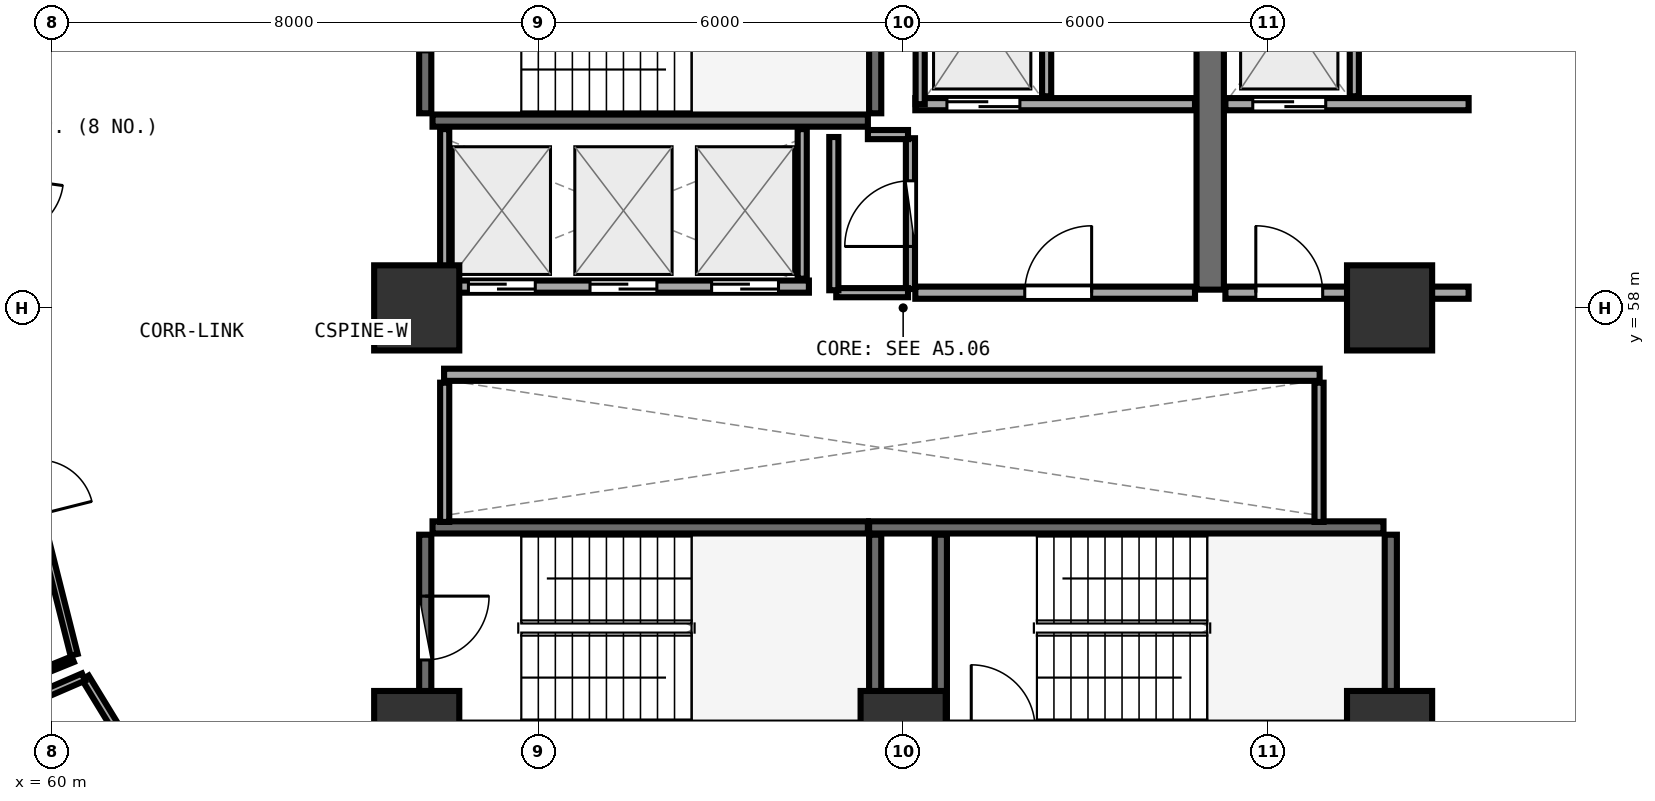
"""IFC4 building model, lengths in metres.
Left out: names, types, materials, properties, quantities, classifications, styles, units other than length and angle.
Written with IfcOpenShell. Run it as: python <this file> out.ifc"""

import sys

from ifc_helpers import new_model, si_unit, direction, frame, frame_2d, origin, origin_2d, place, context, subcontext, project, spatial, rectangle, extrude, element, fill, save


model = new_model("IFC4")
c1 = context("Model", 3, precision=1e-05, world=origin(), true_north=direction((0.0, 1.0)))
c2 = subcontext(c1, "Body", "Model", "MODEL_VIEW")
j1 = project(units=[si_unit("LENGTHUNIT", "METRE"), si_unit("PLANEANGLEUNIT", "RADIAN")], contexts=[c1])
p1 = place(None, origin())
s1 = spatial("IfcSite", under=j1, at=p1, CompositionType="ELEMENT")
p2 = place(p1, origin())
s2 = spatial("IfcBuilding", under=s1, at=p2, CompositionType="ELEMENT")
p3 = place(p2, frame((0.0, 0.0, 30.0)))
s3 = spatial("IfcBuildingStorey", under=s2, at=p3, CompositionType="ELEMENT", Elevation=30.0)
for number, where, z_axis, x_axis in (
    (1, (66.0, 51.0, 0.0), (0.0, 0.0, 1.0), (1.0, 0.0, 0.0)),
    (2, (74.0, 51.0, 0.0), (0.0, 0.0, 1.0), (1.0, 0.0, 0.0)),
    (3, (82.0, 51.0, 0.0), (0.0, 0.0, 1.0), (1.0, 0.0, 0.0)),
    (4, (82.0, 58.0, 0.0), (0.0, 0.0, 1.0), (1.0, 0.0, 0.0)),
    (5, (66.0, 58.0, 0.0), (0.0, 0.0, 1.0), (1.0, 0.0, 0.0)),
):
    element("IfcColumn", number, at=place(p3, frame(where, z_axis=z_axis, x_axis=x_axis)), inside=s3, PredefinedType="PILASTER", context=c2, shape_type="SweptSolid", body=[
        extrude(rectangle(XDim=1.4, YDim=1.4, at=origin_2d()), origin(), (0.0, 0.0, 1.0), 3.75),
    ])
p4 = place(p3, frame((66.26, 61.08, 0.0), z_axis=(0.0, 0.0, 1.0), x_axis=(1.0, 0.0, 0.0)))
e6 = element("IfcWall", 6, at=p4, inside=s3, PredefinedType="SHEAR", context=c2, shape_type="SweptSolid", body=[
    extrude(rectangle(XDim=7.16, YDim=0.2, at=frame_2d((3.58, 0.0))), origin(), (0.0, 0.0, 1.0), 3.49),
])
p5 = place(p3, frame((73.54, 61.2, 0.0), z_axis=(0.0, 0.0, 1.0), x_axis=(0.0, 1.0, 0.0)))
e7 = element("IfcWall", 7, at=p5, inside=s3, PredefinedType="SHEAR", context=c2, shape_type="SweptSolid", body=[
    extrude(rectangle(XDim=3.07, YDim=0.2, at=frame_2d((1.535, 0.0))), origin(), (0.0, 0.0, 1.0), 3.49),
])
p6 = place(p3, frame((66.14, 64.27, 0.0), z_axis=(0.0, 0.0, 1.0), x_axis=(0.0, -1.0, 0.0)))
e8 = element("IfcWall", 8, at=p6, inside=s3, PredefinedType="SHEAR", context=c2, shape_type="SweptSolid", body=[
    extrude(rectangle(XDim=3.07, YDim=0.2, at=frame_2d((1.535, 0.0))), origin(), (0.0, 0.0, 1.0), 3.49),
])
p7 = place(p6, frame((1.01, 0.0, 0.0)))
e9 = element("IfcOpeningElement", 9, at=p7, cuts=e8, PredefinedType="OPENING", context=c2, shape_type="SweptSolid", body=[
    extrude(rectangle(XDim=1.05, YDim=2.1, at=frame_2d((0.525, 1.05))), frame((0.0, 0.11, 0.0), z_axis=(0.0, -1.0, 0.0), x_axis=(1.0, 0.0, 0.0)), (0.0, 0.0, 1.0), 0.22),
])
p8 = place(p3, frame((82.02, 51.2, 0.0), z_axis=(0.0, 0.0, 1.0), x_axis=(0.0, 1.0, 0.0)))
e10 = element("IfcWall", 10, at=p8, inside=s3, PredefinedType="SHEAR", context=c2, shape_type="SweptSolid", body=[
    extrude(rectangle(XDim=3.07, YDim=0.2, at=frame_2d((1.535, 0.0))), origin(), (0.0, 0.0, 1.0), 3.49),
])
p9 = place(p3, frame((81.9, 54.39, 0.0), z_axis=(0.0, 0.0, 1.0), x_axis=(-1.0, 0.0, 0.0)))
e11 = element("IfcWall", 11, at=p9, inside=s3, PredefinedType="SHEAR", context=c2, shape_type="SweptSolid", body=[
    extrude(rectangle(XDim=8.46, YDim=0.2, at=frame_2d((4.23, 0.0))), origin(), (0.0, 0.0, 1.0), 3.49),
])
for number, where, z_axis, x_axis in (
    (12, (74.62, 54.27, 0.0), (0.0, 0.0, 1.0), (0.0, -1.0, 0.0)),
    (13, (73.54, 51.2, 0.0), (0.0, 0.0, 1.0), (0.0, 1.0, 0.0)),
):
    element("IfcWall", number, at=place(p3, frame(where, z_axis=z_axis, x_axis=x_axis)), inside=s3, PredefinedType="SHEAR", context=c2, shape_type="SweptSolid", body=[
        extrude(rectangle(XDim=3.07, YDim=0.2, at=frame_2d((1.535, 0.0))), origin(), (0.0, 0.0, 1.0), 3.49),
    ])
p10 = place(p3, frame((73.42, 54.39, 0.0), z_axis=(0.0, 0.0, 1.0), x_axis=(-1.0, 0.0, 0.0)))
e14 = element("IfcWall", 14, at=p10, inside=s3, PredefinedType="SHEAR", context=c2, shape_type="SweptSolid", body=[
    extrude(rectangle(XDim=7.16, YDim=0.2, at=frame_2d((3.58, 0.0))), origin(), (0.0, 0.0, 1.0), 3.49),
])
p11 = place(p3, frame((66.14, 54.27, 0.0), z_axis=(0.0, 0.0, 1.0), x_axis=(0.0, -1.0, 0.0)))
e15 = element("IfcWall", 15, at=p11, inside=s3, PredefinedType="SHEAR", context=c2, shape_type="SweptSolid", body=[
    extrude(rectangle(XDim=3.07, YDim=0.2, at=frame_2d((1.535, 0.0))), origin(), (0.0, 0.0, 1.0), 3.49),
])
p12 = place(p11, frame((1.01, 0.0, 0.0)))
e16 = element("IfcOpeningElement", 16, at=p12, cuts=e15, PredefinedType="OPENING", context=c2, shape_type="SweptSolid", body=[
    extrude(rectangle(XDim=1.05, YDim=2.1, at=frame_2d((0.525, 1.05))), frame((0.0, 0.11, 0.0), z_axis=(0.0, -1.0, 0.0), x_axis=(1.0, 0.0, 0.0)), (0.0, 0.0, 1.0), 0.22),
])
p13 = place(p3, frame((79.05, 58.3, 0.0), z_axis=(0.0, 0.0, 1.0), x_axis=(0.0, 1.0, 0.0)))
e17 = element("IfcWall", 17, at=p13, inside=s3, PredefinedType="SHEAR", context=c2, shape_type="SweptSolid", body=[
    extrude(rectangle(XDim=6.3, YDim=0.45, at=frame_2d((3.15, 0.0))), origin(), (0.0, 0.0, 1.0), 3.49),
])
p14 = place(p3, frame((74.2, 61.35, 0.0), z_axis=(0.0, 0.0, 1.0), x_axis=(1.0, 0.0, 0.0)))
e18 = element("IfcWall", 18, at=p14, inside=s3, PredefinedType="SOLIDWALL", context=c2, shape_type="SweptSolid", body=[
    extrude(rectangle(XDim=4.6, YDim=0.2, at=frame_2d((2.3, 0.0))), origin(), (0.0, 0.0, 1.0), 3.48),
])
p15 = place(p14, frame((0.52, 0.0, 0.0)))
e19 = element("IfcOpeningElement", 19, at=p15, cuts=e18, PredefinedType="OPENING", context=c2, shape_type="SweptSolid", body=[
    extrude(rectangle(XDim=1.2, YDim=2.15, at=frame_2d((0.6, 1.075))), frame((0.0, 0.11, 0.0), z_axis=(0.0, -1.0, 0.0), x_axis=(1.0, 0.0, 0.0)), (0.0, 0.0, 1.0), 0.22),
])
p16 = place(p3, frame((74.28, 61.35, 0.0), z_axis=(0.0, 0.0, 1.0), x_axis=(0.0, 1.0, 0.0)))
e20 = element("IfcWall", 20, at=p16, inside=s3, PredefinedType="PARTITIONING", context=c2, shape_type="SweptSolid", body=[
    extrude(rectangle(XDim=2.97, YDim=0.15, at=frame_2d((1.485, 0.0))), origin(), (0.0, 0.0, 1.0), 3.48),
])
p17 = place(p3, frame((76.36, 61.48, 0.0), z_axis=(0.0, 0.0, 1.0), x_axis=(0.0, 1.0, 0.0)))
e21 = element("IfcWall", 21, at=p17, inside=s3, PredefinedType="PARTITIONING", context=c2, shape_type="SweptSolid", body=[
    extrude(rectangle(XDim=2.84, YDim=0.15, at=frame_2d((1.42, 0.0))), origin(), (0.0, 0.0, 1.0), 3.48),
])
p18 = place(p3, frame((79.3, 61.35, 0.0), z_axis=(0.0, 0.0, 1.0), x_axis=(1.0, 0.0, 0.0)))
e22 = element("IfcWall", 22, at=p18, inside=s3, PredefinedType="SOLIDWALL", context=c2, shape_type="SweptSolid", body=[
    extrude(rectangle(XDim=4.0, YDim=0.2, at=frame_2d((2.0, 0.0))), origin(), (0.0, 0.0, 1.0), 2.775),
])
p19 = place(p18, frame((0.45, 0.0, 0.0)))
e23 = element("IfcOpeningElement", 23, at=p19, cuts=e22, PredefinedType="OPENING", context=c2, shape_type="SweptSolid", body=[
    extrude(rectangle(XDim=1.2, YDim=2.15, at=frame_2d((0.6, 1.075))), frame((0.0, 0.11, 0.0), z_axis=(0.0, -1.0, 0.0), x_axis=(1.0, 0.0, 0.0)), (0.0, 0.0, 1.0), 0.22),
])
p20 = place(p3, frame((81.42, 61.48, 0.0), z_axis=(0.0, 0.0, 1.0), x_axis=(0.0, 1.0, 0.0)))
e24 = element("IfcWall", 24, at=p20, inside=s3, PredefinedType="PARTITIONING", context=c2, shape_type="SweptSolid", body=[
    extrude(rectangle(XDim=2.84, YDim=0.15, at=frame_2d((1.42, 0.0))), origin(), (0.0, 0.0, 1.0), 3.48),
])
p21 = place(p3, frame((74.2, 58.25, 0.0), z_axis=(0.0, 0.0, 1.0), x_axis=(1.0, 0.0, 0.0)))
e25 = element("IfcWall", 25, at=p21, inside=s3, PredefinedType="SOLIDWALL", context=c2, shape_type="SweptSolid", body=[
    extrude(rectangle(XDim=4.6, YDim=0.2, at=frame_2d((2.3, 0.0))), origin(), (0.0, 0.0, 1.0), 3.48),
])
p22 = place(p21, frame((1.8, 0.0, 0.0)))
e26 = element("IfcOpeningElement", 26, at=p22, cuts=e25, PredefinedType="OPENING", context=c2, shape_type="SweptSolid", body=[
    extrude(rectangle(XDim=1.1, YDim=2.1, at=frame_2d((0.55, 1.05))), frame((0.0, 0.11, 0.0), z_axis=(0.0, -1.0, 0.0), x_axis=(1.0, 0.0, 0.0)), (0.0, 0.0, 1.0), 0.22),
])
p23 = place(p3, frame((79.3, 58.25, 0.0), z_axis=(0.0, 0.0, 1.0), x_axis=(1.0, 0.0, 0.0)))
e27 = element("IfcWall", 27, at=p23, inside=s3, PredefinedType="SOLIDWALL", context=c2, shape_type="SweptSolid", body=[
    extrude(rectangle(XDim=4.0, YDim=0.2, at=frame_2d((2.0, 0.0))), origin(), (0.0, 0.0, 1.0), 2.775),
])
p24 = place(p23, frame((0.5, 0.0, 0.0)))
e28 = element("IfcOpeningElement", 28, at=p24, cuts=e27, PredefinedType="OPENING", context=c2, shape_type="SweptSolid", body=[
    extrude(rectangle(XDim=1.1, YDim=2.1, at=frame_2d((0.55, 1.05))), frame((0.0, 0.11, 0.0), z_axis=(0.0, -1.0, 0.0), x_axis=(1.0, 0.0, 0.0)), (0.0, 0.0, 1.0), 0.22),
])
p25 = place(p3, frame((66.45, 58.35, 0.0), z_axis=(0.0, 0.0, 1.0), x_axis=(1.0, 0.0, 0.0)))
e29 = element("IfcWall", 29, at=p25, inside=s3, PredefinedType="SOLIDWALL", context=c2, shape_type="SweptSolid", body=[
    extrude(rectangle(XDim=6.0, YDim=0.2, at=frame_2d((3.0, 0.0))), origin(), (0.0, 0.0, 1.0), 3.48),
])
p26 = place(p25, frame((0.4, 0.0, 0.0)))
e30 = element("IfcOpeningElement", 30, at=p26, cuts=e29, PredefinedType="OPENING", context=c2, shape_type="SweptSolid", body=[
    extrude(rectangle(XDim=1.1, YDim=2.1, at=frame_2d((0.55, 1.05))), frame((0.0, 0.11, 0.0), z_axis=(0.0, -1.0, 0.0), x_axis=(1.0, 0.0, 0.0)), (0.0, 0.0, 1.0), 0.22),
])
p27 = place(p25, frame((2.4, 0.0, 0.0)))
e31 = element("IfcOpeningElement", 31, at=p27, cuts=e29, PredefinedType="OPENING", context=c2, shape_type="SweptSolid", body=[
    extrude(rectangle(XDim=1.1, YDim=2.1, at=frame_2d((0.55, 1.05))), frame((0.0, 0.11, 0.0), z_axis=(0.0, -1.0, 0.0), x_axis=(1.0, 0.0, 0.0)), (0.0, 0.0, 1.0), 0.22),
])
p28 = place(p25, frame((4.4, 0.0, 0.0)))
e32 = element("IfcOpeningElement", 32, at=p28, cuts=e29, PredefinedType="OPENING", context=c2, shape_type="SweptSolid", body=[
    extrude(rectangle(XDim=1.1, YDim=2.1, at=frame_2d((0.55, 1.05))), frame((0.0, 0.11, 0.0), z_axis=(0.0, -1.0, 0.0), x_axis=(1.0, 0.0, 0.0)), (0.0, 0.0, 1.0), 0.22),
])
for number, where, z_axis, x_axis in (
    (33, (66.46, 58.48, 0.0), (0.0, 0.0, 1.0), (0.0, 1.0, 0.0)),
    (34, (72.34, 58.48, 0.0), (0.0, 0.0, 1.0), (0.0, 1.0, 0.0)),
):
    element("IfcWall", number, at=place(p3, frame(where, z_axis=z_axis, x_axis=x_axis)), inside=s3, PredefinedType="PARTITIONING", context=c2, shape_type="SweptSolid", body=[
        extrude(rectangle(XDim=2.46, YDim=0.15, at=frame_2d((1.23, 0.0))), origin(), (0.0, 0.0, 1.0), 3.48),
    ])
p29 = place(p3, frame((66.45, 56.9, 0.0), z_axis=(0.0, 0.0, 1.0), x_axis=(1.0, 0.0, 0.0)))
e35 = element("IfcWall", 35, at=p29, inside=s3, PredefinedType="SOLIDWALL", context=c2, shape_type="SweptSolid", body=[
    extrude(rectangle(XDim=14.4, YDim=0.2, at=frame_2d((7.2, 0.0))), origin(), (0.0, 0.0, 1.0), 3.48),
])
for number, where, z_axis, x_axis in (
    (36, (66.46, 54.48, 0.0), (0.0, 0.0, 1.0), (0.0, 1.0, 0.0)),
    (37, (80.84, 54.48, 0.0), (0.0, 0.0, 1.0), (0.0, 1.0, 0.0)),
):
    element("IfcWall", number, at=place(p3, frame(where, z_axis=z_axis, x_axis=x_axis)), inside=s3, PredefinedType="PARTITIONING", context=c2, shape_type="SweptSolid", body=[
        extrude(rectangle(XDim=2.29, YDim=0.15, at=frame_2d((1.145, 0.0))), origin(), (0.0, 0.0, 1.0), 3.48),
    ])
p30 = place(p3, frame((74.12, 58.31, 0.0), z_axis=(0.0, 0.0, 1.0), x_axis=(0.0, 1.0, 0.0)))
e38 = element("IfcWall", 38, at=p30, inside=s3, PredefinedType="PARTITIONING", context=c2, shape_type="SweptSolid", body=[
    extrude(rectangle(XDim=2.48, YDim=0.15, at=frame_2d((1.24, 0.0))), origin(), (0.0, 0.0, 1.0), 3.48),
])
p31 = place(p30, frame((0.7, 0.0, 0.0)))
e39 = element("IfcOpeningElement", 39, at=p31, cuts=e38, PredefinedType="OPENING", context=c2, shape_type="SweptSolid", body=[
    extrude(rectangle(XDim=1.08, YDim=2.1, at=frame_2d((0.54, 1.05))), frame((0.0, 0.085, 0.0), z_axis=(0.0, -1.0, 0.0), x_axis=(1.0, 0.0, 0.0)), (0.0, 0.0, 1.0), 0.17),
])
p32 = place(p3, frame((58.986, 57.775, 0.0), z_axis=(0.0, 0.0, 1.0), x_axis=(0.244192294026, -0.969726829338, 0.0)))
e40 = element("IfcWall", 40, at=p32, inside=s3, PredefinedType="PARTITIONING", context=c2, shape_type="SweptSolid", body=[
    extrude(rectangle(XDim=5.651, YDim=0.12, at=frame_2d((2.825, 0.0))), origin(), (0.0, 0.0, 1.0), 3.48),
])
p33 = place(p32, frame((2.375, 0.0, 0.0)))
e41 = element("IfcOpeningElement", 41, at=p33, cuts=e40, PredefinedType="OPENING", context=c2, shape_type="SweptSolid", body=[
    extrude(rectangle(XDim=0.9, YDim=2.08, at=frame_2d((0.45, 1.04))), frame((0.0, 0.07, 0.0), z_axis=(0.0, -1.0, 0.0), x_axis=(1.0, 0.0, 0.0)), (0.0, 0.0, 1.0), 0.14),
])
p34 = place(p3, frame((72.9, 58.25, 0.0), z_axis=(0.0, 0.0, 1.0), x_axis=(1.0, 0.0, 0.0)))
e42 = element("IfcWall", 42, at=p34, inside=s3, PredefinedType="PARTITIONING", context=c2, shape_type="SweptSolid", body=[
    extrude(rectangle(XDim=1.18, YDim=0.15, at=frame_2d((0.59, 0.0))), origin(), (0.0, 0.0, 1.0), 3.48),
])
p35 = place(p3, frame((74.08, 60.85, 0.0), z_axis=(0.0, 0.0, 1.0), x_axis=(-1.0, 0.0, 0.0)))
e43 = element("IfcWall", 43, at=p35, inside=s3, PredefinedType="PARTITIONING", context=c2, shape_type="SweptSolid", body=[
    extrude(rectangle(XDim=0.66, YDim=0.15, at=frame_2d((0.33, 0.0))), origin(), (0.0, 0.0, 1.0), 3.48),
])
p36 = place(p3, frame((72.86, 60.81, 0.0), z_axis=(0.0, 0.0, 1.0), x_axis=(0.0, -1.0, 0.0)))
e44 = element("IfcWall", 44, at=p36, inside=s3, PredefinedType="PARTITIONING", context=c2, shape_type="SweptSolid", body=[
    extrude(rectangle(XDim=2.52, YDim=0.15, at=frame_2d((1.26, 0.0))), origin(), (0.0, 0.0, 1.0), 3.48),
])
p37 = place(p3, frame((60.343, 52.222, 0.0), z_axis=(0.0, 0.0, 1.0), x_axis=(-0.926333713065, -0.376703931542, 0.0)))
e45 = element("IfcWall", 45, at=p37, inside=s3, PredefinedType="PARTITIONING", context=c2, shape_type="SweptSolid", body=[
    extrude(rectangle(XDim=12.099, YDim=0.1, at=frame_2d((6.05, 0.0))), origin(), (0.0, 0.0, 1.0), 2.875),
])
p38 = place(p3, frame((60.549, 51.92, 0.0), z_axis=(0.0, 0.0, 1.0), x_axis=(0.52146609248, -0.853272004928, 0.0)))
e46 = element("IfcWall", 46, at=p38, inside=s3, PredefinedType="PLUMBINGWALL", context=c2, shape_type="SweptSolid", body=[
    extrude(rectangle(XDim=1.228, YDim=0.13, at=frame_2d((0.614, 0.0))), origin(), (0.0, 0.0, 1.0), 3.48),
])
p39 = place(p3, frame((55.91, 49.935, 0.0), z_axis=(0.0, 0.0, 1.0), x_axis=(0.917797204715, 0.397049481826, 0.0)))
e47 = element("IfcWall", 47, at=p39, inside=s3, PredefinedType="PLUMBINGWALL", context=c2, shape_type="SweptSolid", body=[
    extrude(rectangle(XDim=5.023, YDim=0.13, at=frame_2d((2.511, 0.0))), origin(), (0.0, 0.0, 1.0), 2.875),
])
p40 = place(p12, origin())
e48 = element("IfcDoor", 48, at=p40, inside=s3, OperationType="SINGLE_SWING_LEFT", PredefinedType="DOOR", context=c2, shape_type="SweptSolid", body=[
    extrude(rectangle(XDim=1.05, YDim=2.1, at=frame_2d((0.525, 1.05))), frame((0.0, 0.025, 0.0), z_axis=(0.0, -1.0, 0.0), x_axis=(1.0, 0.0, 0.0)), (0.0, 0.0, 1.0), 0.05),
])
fill(e16, e48)
p41 = place(p15, origin())
e49 = element("IfcDoor", 49, at=p41, inside=s3, OperationType="DOUBLE_DOOR_SLIDING", PredefinedType="DOOR", context=c2, shape_type="SweptSolid", body=[
    extrude(rectangle(XDim=1.2, YDim=2.15, at=frame_2d((0.6, 1.075))), frame((0.0, 0.025, 0.0), z_axis=(0.0, -1.0, 0.0), x_axis=(1.0, 0.0, 0.0)), (0.0, 0.0, 1.0), 0.05),
])
fill(e19, e49)
p42 = place(p19, origin())
e50 = element("IfcDoor", 50, at=p42, inside=s3, OperationType="DOUBLE_DOOR_SLIDING", PredefinedType="DOOR", context=c2, shape_type="SweptSolid", body=[
    extrude(rectangle(XDim=1.2, YDim=2.15, at=frame_2d((0.6, 1.075))), frame((0.0, 0.025, 0.0), z_axis=(0.0, -1.0, 0.0), x_axis=(1.0, 0.0, 0.0)), (0.0, 0.0, 1.0), 0.05),
])
fill(e23, e50)
p43 = place(p22, frame((1.1, 0.0, 0.0), z_axis=(0.0, 0.0, 1.0), x_axis=(-1.0, 0.0, 0.0)))
e51 = element("IfcDoor", 51, at=p43, inside=s3, OperationType="SINGLE_SWING_LEFT", PredefinedType="DOOR", context=c2, shape_type="SweptSolid", body=[
    extrude(rectangle(XDim=1.1, YDim=2.1, at=frame_2d((0.55, 1.05))), frame((0.0, 0.025, 0.0), z_axis=(0.0, -1.0, 0.0), x_axis=(1.0, 0.0, 0.0)), (0.0, 0.0, 1.0), 0.05),
])
fill(e26, e51)
p44 = place(p24, frame((1.1, 0.0, 0.0), z_axis=(0.0, 0.0, 1.0), x_axis=(-1.0, 0.0, 0.0)))
e52 = element("IfcDoor", 52, at=p44, inside=s3, OperationType="SINGLE_SWING_RIGHT", PredefinedType="DOOR", context=c2, shape_type="SweptSolid", body=[
    extrude(rectangle(XDim=1.1, YDim=2.1, at=frame_2d((0.55, 1.05))), frame((0.0, 0.025, 0.0), z_axis=(0.0, -1.0, 0.0), x_axis=(1.0, 0.0, 0.0)), (0.0, 0.0, 1.0), 0.05),
])
fill(e28, e52)
p45 = place(p26, origin())
e53 = element("IfcDoor", 53, at=p45, inside=s3, OperationType="DOUBLE_DOOR_SLIDING", PredefinedType="DOOR", context=c2, shape_type="SweptSolid", body=[
    extrude(rectangle(XDim=1.1, YDim=2.1, at=frame_2d((0.55, 1.05))), frame((0.0, 0.025, 0.0), z_axis=(0.0, -1.0, 0.0), x_axis=(1.0, 0.0, 0.0)), (0.0, 0.0, 1.0), 0.05),
])
fill(e30, e53)
p46 = place(p27, origin())
e54 = element("IfcDoor", 54, at=p46, inside=s3, OperationType="DOUBLE_DOOR_SLIDING", PredefinedType="DOOR", context=c2, shape_type="SweptSolid", body=[
    extrude(rectangle(XDim=1.1, YDim=2.1, at=frame_2d((0.55, 1.05))), frame((0.0, 0.025, 0.0), z_axis=(0.0, -1.0, 0.0), x_axis=(1.0, 0.0, 0.0)), (0.0, 0.0, 1.0), 0.05),
])
fill(e31, e54)
p47 = place(p28, origin())
e55 = element("IfcDoor", 55, at=p47, inside=s3, OperationType="DOUBLE_DOOR_SLIDING", PredefinedType="DOOR", context=c2, shape_type="SweptSolid", body=[
    extrude(rectangle(XDim=1.1, YDim=2.1, at=frame_2d((0.55, 1.05))), frame((0.0, 0.025, 0.0), z_axis=(0.0, -1.0, 0.0), x_axis=(1.0, 0.0, 0.0)), (0.0, 0.0, 1.0), 0.05),
])
fill(e32, e55)
p48 = place(p31, origin())
e56 = element("IfcDoor", 56, at=p48, inside=s3, OperationType="SINGLE_SWING_LEFT", PredefinedType="DOOR", context=c2, shape_type="SweptSolid", body=[
    extrude(rectangle(XDim=1.08, YDim=2.1, at=frame_2d((0.54, 1.05))), frame((0.0, 0.025, 0.0), z_axis=(0.0, -1.0, 0.0), x_axis=(1.0, 0.0, 0.0)), (0.0, 0.0, 1.0), 0.05),
])
fill(e39, e56)
save(model, sys.argv[1])
